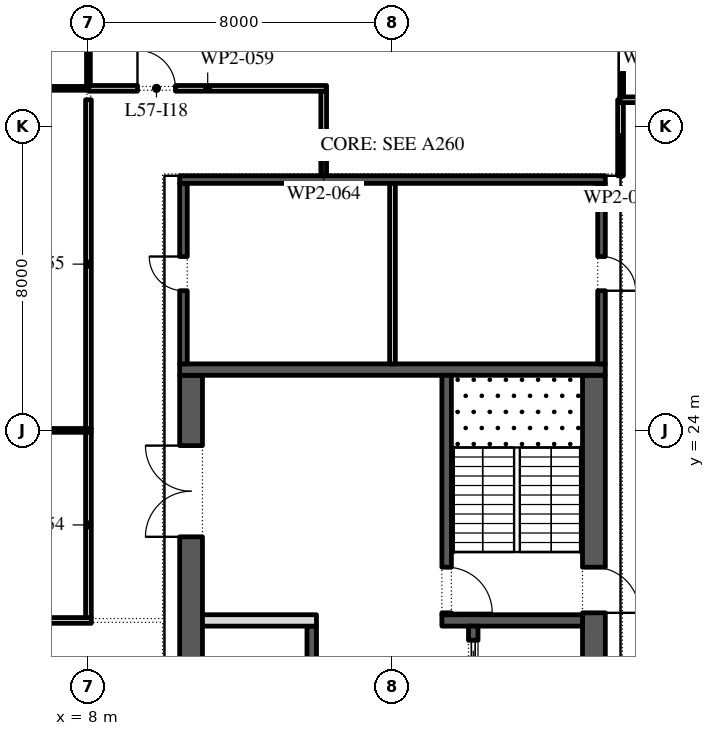
"""IFC4 building model, lengths in metres.
Left out: names, types, materials, properties, quantities, classifications, styles, units other than length and angle.
Written with IfcOpenShell. Run it as: python <this file> out.ifc"""

import sys

from ifc_helpers import new_model, si_unit, direction, frame, frame_2d, origin, place, context, subcontext, project, spatial, rectangle, extrude, element, fill, save


model = new_model("IFC4")
c1 = context("Model", 3, precision=1e-05, world=origin(), true_north=direction((0.0, 1.0)))
c2 = subcontext(c1, "Body", "Model", "MODEL_VIEW")
j1 = project(units=[si_unit("LENGTHUNIT", "METRE"), si_unit("PLANEANGLEUNIT", "RADIAN")], contexts=[c1])
p1 = place(None, origin())
s1 = spatial("IfcSite", under=j1, at=p1, CompositionType="ELEMENT")
p2 = place(p1, origin())
s2 = spatial("IfcBuilding", under=s1, at=p2, CompositionType="ELEMENT")
p3 = place(p2, frame((0.0, 0.0, 264.0)))
s3 = spatial("IfcBuildingStorey", under=s2, at=p3, CompositionType="ELEMENT", Elevation=264.0)
p4 = place(p3, frame((21.359, -11.678, 0.0), z_axis=(0.0, 0.0, 1.0), x_axis=(0.224949198343, 0.974370493275, 0.0)))
e1 = element("IfcWall", 1, at=p4, inside=s3, PredefinedType="STANDARD", context=c2, shape_type="SweptSolid", body=[
    extrude(rectangle(XDim=49.5, YDim=0.3, at=frame_2d((24.75, 0.0))), origin(), (0.0, 0.0, 1.0), 4.0),
])
p5 = place(p4, frame((1.157, 0.0, 0.45)))
e2 = element("IfcOpeningElement", 2, at=p5, cuts=e1, PredefinedType="OPENING", context=c2, shape_type="SweptSolid", body=[
    extrude(rectangle(XDim=4.5, YDim=3.05, at=frame_2d((2.25, 1.525))), frame((0.0, 0.16, 0.0), z_axis=(0.0, -1.0, 0.0), x_axis=(1.0, 0.0, 0.0)), (0.0, 0.0, 1.0), 0.32),
])
p6 = place(p4, frame((8.121, 0.0, 0.45)))
e3 = element("IfcOpeningElement", 3, at=p6, cuts=e1, PredefinedType="OPENING", context=c2, shape_type="SweptSolid", body=[
    extrude(rectangle(XDim=4.5, YDim=3.05, at=frame_2d((2.25, 1.525))), frame((0.0, 0.16, 0.0), z_axis=(0.0, -1.0, 0.0), x_axis=(1.0, 0.0, 0.0)), (0.0, 0.0, 1.0), 0.32),
])
p7 = place(p4, frame((15.236, 0.0, 0.45)))
e4 = element("IfcOpeningElement", 4, at=p7, cuts=e1, PredefinedType="OPENING", context=c2, shape_type="SweptSolid", body=[
    extrude(rectangle(XDim=4.5, YDim=3.05, at=frame_2d((2.25, 1.525))), frame((0.0, 0.16, 0.0), z_axis=(0.0, -1.0, 0.0), x_axis=(1.0, 0.0, 0.0)), (0.0, 0.0, 1.0), 0.32),
])
p8 = place(p4, frame((22.35, 0.0, 0.45)))
e5 = element("IfcOpeningElement", 5, at=p8, cuts=e1, PredefinedType="OPENING", context=c2, shape_type="SweptSolid", body=[
    extrude(rectangle(XDim=4.5, YDim=3.05, at=frame_2d((2.25, 1.525))), frame((0.0, 0.16, 0.0), z_axis=(0.0, -1.0, 0.0), x_axis=(1.0, 0.0, 0.0)), (0.0, 0.0, 1.0), 0.32),
])
p9 = place(p4, frame((29.464, 0.0, 0.45)))
e6 = element("IfcOpeningElement", 6, at=p9, cuts=e1, PredefinedType="OPENING", context=c2, shape_type="SweptSolid", body=[
    extrude(rectangle(XDim=4.5, YDim=2.95, at=frame_2d((2.25, 1.475))), frame((0.0, 0.16, 0.0), z_axis=(0.0, -1.0, 0.0), x_axis=(1.0, 0.0, 0.0)), (0.0, 0.0, 1.0), 0.32),
])
p10 = place(p4, frame((37.628, 0.0, 0.0)))
e7 = element("IfcOpeningElement", 7, at=p10, cuts=e1, PredefinedType="OPENING", context=c2, shape_type="SweptSolid", body=[
    extrude(rectangle(XDim=2.4, YDim=3.325, at=frame_2d((1.2, 1.663))), frame((0.0, 0.16, 0.0), z_axis=(0.0, -1.0, 0.0), x_axis=(1.0, 0.0, 0.0)), (0.0, 0.0, 1.0), 0.32),
])
p11 = place(p4, frame((43.693, 0.0, 0.45)))
e8 = element("IfcOpeningElement", 8, at=p11, cuts=e1, PredefinedType="OPENING", context=c2, shape_type="SweptSolid", body=[
    extrude(rectangle(XDim=4.5, YDim=3.05, at=frame_2d((2.25, 1.525))), frame((0.0, 0.16, 0.0), z_axis=(0.0, -1.0, 0.0), x_axis=(1.0, 0.0, 0.0)), (0.0, 0.0, 1.0), 0.32),
])
p12 = place(p3, frame((21.3, -2.45, 0.0), z_axis=(0.0, 0.0, 1.0), x_axis=(0.0, 1.0, 0.0)))
e9 = element("IfcWall", 9, at=p12, inside=s3, PredefinedType="SHEAR", context=c2, shape_type="SweptSolid", body=[
    extrude(rectangle(XDim=27.9, YDim=0.6, at=frame_2d((13.95, 0.0))), origin(), (0.0, 0.0, 1.0), 4.0),
])
p13 = place(p12, frame((5.05, 0.0, 0.0)))
e10 = element("IfcOpeningElement", 10, at=p13, cuts=e9, PredefinedType="OPENING", context=c2, shape_type="SweptSolid", body=[
    extrude(rectangle(XDim=1.2, YDim=2.1, at=frame_2d((0.6, 1.05))), frame((0.0, 0.31, 0.0), z_axis=(0.0, -1.0, 0.0), x_axis=(1.0, 0.0, 0.0)), (0.0, 0.0, 1.0), 0.62),
])
p14 = place(p12, frame((21.65, 0.0, 0.0)))
e11 = element("IfcOpeningElement", 11, at=p14, cuts=e9, PredefinedType="OPENING", context=c2, shape_type="SweptSolid", body=[
    extrude(rectangle(XDim=1.2, YDim=2.1, at=frame_2d((0.6, 1.05))), frame((0.0, 0.31, 0.0), z_axis=(0.0, -1.0, 0.0), x_axis=(1.0, 0.0, 0.0)), (0.0, 0.0, 1.0), 0.62),
])
p15 = place(p3, frame((10.7, -2.45, 0.0), z_axis=(0.0, 0.0, 1.0), x_axis=(0.0, 1.0, 0.0)))
e12 = element("IfcWall", 12, at=p15, inside=s3, PredefinedType="SHEAR", context=c2, shape_type="SweptSolid", body=[
    extrude(rectangle(XDim=27.9, YDim=0.6, at=frame_2d((13.95, 0.0))), origin(), (0.0, 0.0, 1.0), 4.0),
])
p16 = place(p15, frame((23.65, 0.0, 0.0)))
e13 = element("IfcOpeningElement", 13, at=p16, cuts=e12, PredefinedType="OPENING", context=c2, shape_type="SweptSolid", body=[
    extrude(rectangle(XDim=2.4, YDim=2.1, at=frame_2d((1.2, 1.05))), frame((0.0, 0.31, 0.0), z_axis=(0.0, -1.0, 0.0), x_axis=(1.0, 0.0, 0.0)), (0.0, 0.0, 1.0), 0.62),
])
p17 = place(p15, frame((1.387, 0.0, 0.0)))
e14 = element("IfcOpeningElement", 14, at=p17, cuts=e12, PredefinedType="OPENING", context=c2, shape_type="SweptSolid", body=[
    extrude(rectangle(XDim=0.9, YDim=2.1, at=frame_2d((0.45, 1.05))), frame((0.0, 0.31, 0.0), z_axis=(0.0, -1.0, 0.0), x_axis=(1.0, 0.0, 0.0)), (0.0, 0.0, 1.0), 0.62),
])
p18 = place(p15, frame((4.562, 0.0, 0.0)))
e15 = element("IfcOpeningElement", 15, at=p18, cuts=e12, PredefinedType="OPENING", context=c2, shape_type="SweptSolid", body=[
    extrude(rectangle(XDim=1.0, YDim=2.1, at=frame_2d((0.5, 1.05))), frame((0.0, 0.31, 0.0), z_axis=(0.0, -1.0, 0.0), x_axis=(1.0, 0.0, 0.0)), (0.0, 0.0, 1.0), 0.62),
])
p19 = place(p3, frame((10.4, 25.6, 0.0), z_axis=(0.0, 0.0, 1.0), x_axis=(1.0, 0.0, 0.0)))
e16 = element("IfcWall", 16, at=p19, inside=s3, PredefinedType="SHEAR", context=c2, shape_type="SweptSolid", body=[
    extrude(rectangle(XDim=11.2, YDim=0.3, at=frame_2d((5.6, 0.0))), origin(), (0.0, 0.0, 1.0), 4.0),
])
p20 = place(p3, frame((17.3, 19.0, 0.0), z_axis=(0.0, 0.0, 1.0), x_axis=(1.0, 0.0, 0.0)))
e17 = element("IfcWall", 17, at=p20, inside=s3, PredefinedType="SHEAR", context=c2, shape_type="SweptSolid", body=[
    extrude(rectangle(XDim=3.7, YDim=0.3, at=frame_2d((1.85, 0.0))), origin(), (0.0, 0.0, 1.0), 4.0),
])
p21 = place(p3, frame((17.425, 19.15, 0.0), z_axis=(0.0, 0.0, 1.0), x_axis=(0.0, 1.0, 0.0)))
e18 = element("IfcWall", 18, at=p21, inside=s3, PredefinedType="SHEAR", context=c2, shape_type="SweptSolid", body=[
    extrude(rectangle(XDim=6.3, YDim=0.25, at=frame_2d((3.15, 0.0))), origin(), (0.0, 0.0, 1.0), 4.0),
])
p22 = place(p21, frame((0.05, 0.0, 0.0)))
e19 = element("IfcOpeningElement", 19, at=p22, cuts=e18, PredefinedType="OPENING", context=c2, shape_type="SweptSolid", body=[
    extrude(rectangle(XDim=1.2, YDim=2.1, at=frame_2d((0.6, 1.05))), frame((0.0, 0.135, 0.0), z_axis=(0.0, -1.0, 0.0), x_axis=(1.0, 0.0, 0.0)), (0.0, 0.0, 1.0), 0.27),
])
p23 = place(p3, frame((18.125, 4.15, 0.0), z_axis=(0.0, 0.0, 1.0), x_axis=(0.0, 1.0, 0.0)))
e20 = element("IfcWall", 20, at=p23, inside=s3, PredefinedType="SHEAR", context=c2, shape_type="SweptSolid", body=[
    extrude(rectangle(XDim=14.7, YDim=0.25, at=frame_2d((7.35, 0.0))), origin(), (0.0, 0.0, 1.0), 4.0),
])
p24 = place(p23, frame((3.446, 0.0, 0.0)))
e21 = element("IfcOpeningElement", 21, at=p24, cuts=e20, PredefinedType="OPENING", context=c2, shape_type="SweptSolid", body=[
    extrude(rectangle(XDim=0.9, YDim=2.1, at=frame_2d((0.45, 1.05))), frame((0.0, 0.135, 0.0), z_axis=(0.0, -1.0, 0.0), x_axis=(1.0, 0.0, 0.0)), (0.0, 0.0, 1.0), 0.27),
])
p25 = place(p23, frame((6.9, 0.0, 0.0)))
e22 = element("IfcOpeningElement", 22, at=p25, cuts=e20, PredefinedType="OPENING", context=c2, shape_type="SweptSolid", body=[
    extrude(rectangle(XDim=0.9, YDim=2.1, at=frame_2d((0.45, 1.05))), frame((0.0, 0.135, 0.0), z_axis=(0.0, -1.0, 0.0), x_axis=(1.0, 0.0, 0.0)), (0.0, 0.0, 1.0), 0.27),
])
p26 = place(p23, frame((10.354, 0.0, 0.0)))
e23 = element("IfcOpeningElement", 23, at=p26, cuts=e20, PredefinedType="OPENING", context=c2, shape_type="SweptSolid", body=[
    extrude(rectangle(XDim=0.9, YDim=2.1, at=frame_2d((0.45, 1.05))), frame((0.0, 0.135, 0.0), z_axis=(0.0, -1.0, 0.0), x_axis=(1.0, 0.0, 0.0)), (0.0, 0.0, 1.0), 0.27),
])
p27 = place(p23, frame((0.371, 0.0, 0.0)))
e24 = element("IfcOpeningElement", 24, at=p27, cuts=e20, PredefinedType="OPENING", context=c2, shape_type="SweptSolid", body=[
    extrude(rectangle(XDim=1.1, YDim=2.1, at=frame_2d((0.55, 1.05))), frame((0.0, 0.135, 0.0), z_axis=(0.0, -1.0, 0.0), x_axis=(1.0, 0.0, 0.0)), (0.0, 0.0, 1.0), 0.27),
])
p28 = place(p23, frame((13.229, 0.0, 0.0)))
e25 = element("IfcOpeningElement", 25, at=p28, cuts=e20, PredefinedType="OPENING", context=c2, shape_type="SweptSolid", body=[
    extrude(rectangle(XDim=1.1, YDim=2.1, at=frame_2d((0.55, 1.05))), frame((0.0, 0.135, 0.0), z_axis=(0.0, -1.0, 0.0), x_axis=(1.0, 0.0, 0.0)), (0.0, 0.0, 1.0), 0.27),
])
p29 = place(p3, frame((13.875, -2.45, 0.0), z_axis=(0.0, 0.0, 1.0), x_axis=(0.0, 1.0, 0.0)))
e26 = element("IfcWall", 26, at=p29, inside=s3, PredefinedType="SHEAR", context=c2, shape_type="SweptSolid", body=[
    extrude(rectangle(XDim=21.3, YDim=0.25, at=frame_2d((10.65, 0.0))), origin(), (0.0, 0.0, 1.0), 4.0),
])
p30 = place(p29, frame((17.786, 0.0, 0.0)))
e27 = element("IfcOpeningElement", 27, at=p30, cuts=e26, PredefinedType="OPENING", context=c2, shape_type="SweptSolid", body=[
    extrude(rectangle(XDim=0.9, YDim=2.1, at=frame_2d((0.45, 1.05))), frame((0.0, 0.135, 0.0), z_axis=(0.0, -1.0, 0.0), x_axis=(1.0, 0.0, 0.0)), (0.0, 0.0, 1.0), 0.27),
])
p31 = place(p29, frame((6.971, 0.0, 0.0)))
e28 = element("IfcOpeningElement", 28, at=p31, cuts=e26, PredefinedType="OPENING", context=c2, shape_type="SweptSolid", body=[
    extrude(rectangle(XDim=1.1, YDim=2.1, at=frame_2d((0.55, 1.05))), frame((0.0, 0.135, 0.0), z_axis=(0.0, -1.0, 0.0), x_axis=(1.0, 0.0, 0.0)), (0.0, 0.0, 1.0), 0.27),
])
p32 = place(p29, frame((9.114, 0.0, 0.0)))
e29 = element("IfcOpeningElement", 29, at=p32, cuts=e26, PredefinedType="OPENING", context=c2, shape_type="SweptSolid", body=[
    extrude(rectangle(XDim=1.1, YDim=2.1, at=frame_2d((0.55, 1.05))), frame((0.0, 0.135, 0.0), z_axis=(0.0, -1.0, 0.0), x_axis=(1.0, 0.0, 0.0)), (0.0, 0.0, 1.0), 0.27),
])
p33 = place(p29, frame((11.257, 0.0, 0.0)))
e30 = element("IfcOpeningElement", 30, at=p33, cuts=e26, PredefinedType="OPENING", context=c2, shape_type="SweptSolid", body=[
    extrude(rectangle(XDim=1.1, YDim=2.1, at=frame_2d((0.55, 1.05))), frame((0.0, 0.135, 0.0), z_axis=(0.0, -1.0, 0.0), x_axis=(1.0, 0.0, 0.0)), (0.0, 0.0, 1.0), 0.27),
])
p34 = place(p29, frame((13.4, 0.0, 0.0)))
e31 = element("IfcOpeningElement", 31, at=p34, cuts=e26, PredefinedType="OPENING", context=c2, shape_type="SweptSolid", body=[
    extrude(rectangle(XDim=1.1, YDim=2.1, at=frame_2d((0.55, 1.05))), frame((0.0, 0.135, 0.0), z_axis=(0.0, -1.0, 0.0), x_axis=(1.0, 0.0, 0.0)), (0.0, 0.0, 1.0), 0.27),
])
p35 = place(p3, frame((11.0, 19.0, 0.0), z_axis=(0.0, 0.0, 1.0), x_axis=(1.0, 0.0, 0.0)))
e32 = element("IfcWall", 32, at=p35, inside=s3, PredefinedType="PARTITIONING", context=c2, shape_type="SweptSolid", body=[
    extrude(rectangle(XDim=3.0, YDim=0.3, at=frame_2d((1.5, 0.0))), origin(), (0.0, 0.0, 1.0), 4.0),
])
p36 = place(p3, frame((21.5, 25.75, 0.0), z_axis=(0.0, 0.0, 1.0), x_axis=(0.0, 1.0, 0.0)))
e33 = element("IfcWall", 33, at=p36, inside=s3, PredefinedType="SHEAR", context=c2, shape_type="SweptSolid", body=[
    extrude(rectangle(XDim=4.75, YDim=0.2, at=frame_2d((2.375, 0.0))), origin(), (0.0, 0.0, 1.0), 4.0),
])
p37 = place(p36, frame((1.925, 0.0, 0.0)))
e34 = element("IfcOpeningElement", 34, at=p37, cuts=e33, PredefinedType="OPENING", context=c2, shape_type="SweptSolid", body=[
    extrude(rectangle(XDim=0.9, YDim=2.1, at=frame_2d((0.45, 1.05))), frame((0.0, 0.11, 0.0), z_axis=(0.0, -1.0, 0.0), x_axis=(1.0, 0.0, 0.0)), (0.0, 0.0, 1.0), 0.22),
])
p38 = place(p3, frame((10.5, 25.75, 0.0), z_axis=(0.0, 0.0, 1.0), x_axis=(0.0, 1.0, 0.0)))
e35 = element("IfcWall", 35, at=p38, inside=s3, PredefinedType="SHEAR", context=c2, shape_type="SweptSolid", body=[
    extrude(rectangle(XDim=4.75, YDim=0.2, at=frame_2d((2.375, 0.0))), origin(), (0.0, 0.0, 1.0), 4.0),
])
p39 = place(p38, frame((1.925, 0.0, 0.0)))
e36 = element("IfcOpeningElement", 36, at=p39, cuts=e35, PredefinedType="OPENING", context=c2, shape_type="SweptSolid", body=[
    extrude(rectangle(XDim=0.9, YDim=2.1, at=frame_2d((0.45, 1.05))), frame((0.0, 0.11, 0.0), z_axis=(0.0, -1.0, 0.0), x_axis=(1.0, 0.0, 0.0)), (0.0, 0.0, 1.0), 0.22),
])
p40 = place(p3, frame((10.4, 30.6, 0.0), z_axis=(0.0, 0.0, 1.0), x_axis=(1.0, 0.0, 0.0)))
e37 = element("IfcWall", 37, at=p40, inside=s3, PredefinedType="SHEAR", context=c2, shape_type="SweptSolid", body=[
    extrude(rectangle(XDim=11.2, YDim=0.2, at=frame_2d((5.6, 0.0))), origin(), (0.0, 0.0, 1.0), 4.0),
])
p41 = place(p3, frame((16.0, 25.75, 0.0), z_axis=(0.0, 0.0, 1.0), x_axis=(0.0, 1.0, 0.0)))
e38 = element("IfcWall", 38, at=p41, inside=s3, PredefinedType="PARTITIONING", context=c2, shape_type="SweptSolid", body=[
    extrude(rectangle(XDim=4.75, YDim=0.15, at=frame_2d((2.375, 0.0))), origin(), (0.0, 0.0, 1.0), 4.0),
])
p42 = place(p3, frame((1.025, 19.0, 0.0), z_axis=(0.0, 0.0, 1.0), x_axis=(1.0, 0.0, 0.0)))
e39 = element("IfcWall", 39, at=p42, inside=s3, PredefinedType="PARTITIONING", context=c2, shape_type="SweptSolid", body=[
    extrude(rectangle(XDim=7.05, YDim=0.15, at=frame_2d((3.525, 0.0))), origin(), (0.0, 0.0, 1.0), 4.0),
])
p43 = place(p42, frame((3.825, 0.0, 0.0)))
e40 = element("IfcOpeningElement", 40, at=p43, cuts=e39, PredefinedType="OPENING", context=c2, shape_type="SweptSolid", body=[
    extrude(rectangle(XDim=1.0, YDim=2.1, at=frame_2d((0.5, 1.05))), frame((0.0, 0.085, 0.0), z_axis=(0.0, -1.0, 0.0), x_axis=(1.0, 0.0, 0.0)), (0.0, 0.0, 1.0), 0.17),
])
p44 = place(p3, frame((1.175, 24.0, 0.0), z_axis=(0.0, 0.0, 1.0), x_axis=(1.0, 0.0, 0.0)))
e41 = element("IfcWall", 41, at=p44, inside=s3, PredefinedType="PARTITIONING", context=c2, shape_type="SweptSolid", body=[
    extrude(rectangle(XDim=6.9, YDim=0.1, at=frame_2d((3.45, 0.0))), origin(), (0.0, 0.0, 1.0), 4.0),
])
p45 = place(p3, frame((8.0, 19.075, 0.0), z_axis=(0.0, 0.0, 1.0), x_axis=(0.0, 1.0, 0.0)))
e42 = element("IfcWall", 42, at=p45, inside=s3, PredefinedType="PARTITIONING", context=c2, shape_type="SweptSolid", body=[
    extrude(rectangle(XDim=4.875, YDim=0.15, at=frame_2d((2.438, 0.0))), origin(), (0.0, 0.0, 1.0), 4.0),
])
p46 = place(p3, frame((8.0, 24.05, 0.0), z_axis=(0.0, 0.0, 1.0), x_axis=(0.0, 1.0, 0.0)))
e43 = element("IfcWall", 43, at=p46, inside=s3, PredefinedType="PARTITIONING", context=c2, shape_type="SweptSolid", body=[
    extrude(rectangle(XDim=8.65, YDim=0.15, at=frame_2d((4.325, 0.0))), origin(), (0.0, 0.0, 1.0), 4.0),
])
p47 = place(p3, frame((8.05, 33.0, 0.0), z_axis=(0.0, 0.0, 1.0), x_axis=(-1.0, 0.0, 0.0)))
e44 = element("IfcWall", 44, at=p47, inside=s3, PredefinedType="PARTITIONING", context=c2, shape_type="SweptSolid", body=[
    extrude(rectangle(XDim=6.875, YDim=0.1, at=frame_2d((3.438, 0.0))), origin(), (0.0, 0.0, 1.0), 4.0),
])
p48 = place(p3, frame((8.0, 33.05, 0.0), z_axis=(0.0, 0.0, 1.0), x_axis=(0.0, 1.0, 0.0)))
e45 = element("IfcWall", 45, at=p48, inside=s3, PredefinedType="PARTITIONING", context=c2, shape_type="SweptSolid", body=[
    extrude(rectangle(XDim=6.5, YDim=0.1, at=frame_2d((3.25, 0.0))), origin(), (0.0, 0.0, 1.0), 4.0),
])
p49 = place(p3, frame((8.01, 33.0, 0.0), z_axis=(0.0, 0.0, 1.0), x_axis=(1.0, 0.0, 0.0)))
e46 = element("IfcWall", 46, at=p49, inside=s3, PredefinedType="PARTITIONING", context=c2, shape_type="SweptSolid", body=[
    extrude(rectangle(XDim=6.255, YDim=0.15, at=frame_2d((3.127, 0.0))), origin(), (0.0, 0.0, 1.0), 4.0),
])
p50 = place(p49, frame((1.28, 0.0, 0.0)))
e47 = element("IfcOpeningElement", 47, at=p50, cuts=e46, PredefinedType="OPENING", context=c2, shape_type="SweptSolid", body=[
    extrude(rectangle(XDim=1.0, YDim=2.1, at=frame_2d((0.5, 1.05))), frame((0.0, 0.085, 0.0), z_axis=(0.0, -1.0, 0.0), x_axis=(1.0, 0.0, 0.0)), (0.0, 0.0, 1.0), 0.17),
])
p51 = place(p3, frame((14.19, 32.925, 0.0), z_axis=(0.0, 0.0, 1.0), x_axis=(0.0, -1.0, 0.0)))
e48 = element("IfcWall", 48, at=p51, inside=s3, PredefinedType="PARTITIONING", context=c2, shape_type="SweptSolid", body=[
    extrude(rectangle(XDim=2.225, YDim=0.15, at=frame_2d((1.113, 0.0))), origin(), (0.0, 0.0, 1.0), 4.0),
])
p52 = place(p3, frame((22.0, 30.7, 0.0), z_axis=(0.0, 0.0, 1.0), x_axis=(0.0, 1.0, 0.0)))
e49 = element("IfcWall", 49, at=p52, inside=s3, PredefinedType="PARTITIONING", context=c2, shape_type="SweptSolid", body=[
    extrude(rectangle(XDim=2.0, YDim=0.15, at=frame_2d((1.0, 0.0))), origin(), (0.0, 0.0, 1.0), 4.0),
])
p53 = place(p3, frame((21.98, 32.7, 0.0), z_axis=(0.0, 0.0, 1.0), x_axis=(1.0, 0.0, 0.0)))
e50 = element("IfcWall", 50, at=p53, inside=s3, PredefinedType="PARTITIONING", context=c2, shape_type="SweptSolid", body=[
    extrude(rectangle(XDim=2.095, YDim=0.15, at=frame_2d((1.047, 0.0))), origin(), (0.0, 0.0, 1.0), 4.0),
])
p54 = place(p3, frame((22.03, 39.45, 0.0), z_axis=(0.0, 0.0, 1.0), x_axis=(0.0, -1.0, 0.0)))
e51 = element("IfcWall", 51, at=p54, inside=s3, PredefinedType="PARTITIONING", context=c2, shape_type="SweptSolid", body=[
    extrude(rectangle(XDim=6.675, YDim=0.1, at=frame_2d((3.337, 0.0))), origin(), (0.0, 0.0, 1.0), 4.0),
])
p55 = place(p28, origin())
e52 = element("IfcDoor", 52, at=p55, inside=s3, OperationType="SLIDING_TO_LEFT", PredefinedType="DOOR", context=c2, shape_type="SweptSolid", body=[
    extrude(rectangle(XDim=1.1, YDim=2.1, at=frame_2d((0.55, 1.05))), frame((0.0, 0.025, 0.0), z_axis=(0.0, -1.0, 0.0), x_axis=(1.0, 0.0, 0.0)), (0.0, 0.0, 1.0), 0.05),
])
fill(e25, e52)
p56 = place(p16, origin())
e53 = element("IfcDoor", 53, at=p56, inside=s3, OperationType="DOUBLE_DOOR_SINGLE_SWING", PredefinedType="DOOR", context=c2, shape_type="SweptSolid", body=[
    extrude(rectangle(XDim=2.4, YDim=2.1, at=frame_2d((1.2, 1.05))), frame((0.0, 0.025, 0.0), z_axis=(0.0, -1.0, 0.0), x_axis=(1.0, 0.0, 0.0)), (0.0, 0.0, 1.0), 0.05),
])
fill(e13, e53)
p57 = place(p22, frame((1.2, 0.0, 0.0), z_axis=(0.0, 0.0, 1.0), x_axis=(-1.0, 0.0, 0.0)))
e54 = element("IfcDoor", 54, at=p57, inside=s3, OperationType="SINGLE_SWING_LEFT", PredefinedType="DOOR", context=c2, shape_type="SweptSolid", body=[
    extrude(rectangle(XDim=1.2, YDim=2.1, at=frame_2d((0.6, 1.05))), frame((0.0, 0.025, 0.0), z_axis=(0.0, -1.0, 0.0), x_axis=(1.0, 0.0, 0.0)), (0.0, 0.0, 1.0), 0.05),
])
fill(e19, e54)
p58 = place(p14, frame((1.2, 0.0, 0.0), z_axis=(0.0, 0.0, 1.0), x_axis=(-1.0, 0.0, 0.0)))
e55 = element("IfcDoor", 55, at=p58, inside=s3, OperationType="SINGLE_SWING_LEFT", PredefinedType="DOOR", context=c2, shape_type="SweptSolid", body=[
    extrude(rectangle(XDim=1.2, YDim=2.1, at=frame_2d((0.6, 1.05))), frame((0.0, 0.025, 0.0), z_axis=(0.0, -1.0, 0.0), x_axis=(1.0, 0.0, 0.0)), (0.0, 0.0, 1.0), 0.05),
])
fill(e11, e55)
p59 = place(p37, frame((0.9, 0.15, 0.0), z_axis=(0.0, 0.0, 1.0), x_axis=(-1.0, 0.0, 0.0)))
e56 = element("IfcDoor", 56, at=p59, inside=s3, OperationType="SINGLE_SWING_LEFT", PredefinedType="DOOR", context=c2, shape_type="SweptSolid", body=[
    extrude(rectangle(XDim=0.9, YDim=2.1, at=frame_2d((0.45, 1.05))), frame((0.0, 0.1, 0.0), z_axis=(0.0, -1.0, 0.0), x_axis=(1.0, 0.0, 0.0)), (0.0, 0.0, 1.0), 0.05),
])
fill(e34, e56)
p60 = place(p39, origin())
e57 = element("IfcDoor", 57, at=p60, inside=s3, OperationType="SINGLE_SWING_LEFT", PredefinedType="DOOR", context=c2, shape_type="SweptSolid", body=[
    extrude(rectangle(XDim=0.9, YDim=2.1, at=frame_2d((0.45, 1.05))), frame((0.0, -0.05, 0.0), z_axis=(0.0, -1.0, 0.0), x_axis=(1.0, 0.0, 0.0)), (0.0, 0.0, 1.0), 0.05),
])
fill(e36, e57)
p61 = place(p50, origin())
e58 = element("IfcDoor", 58, at=p61, inside=s3, OperationType="SINGLE_SWING_RIGHT", PredefinedType="DOOR", context=c2, shape_type="SweptSolid", body=[
    extrude(rectangle(XDim=1.0, YDim=2.1, at=frame_2d((0.5, 1.05))), frame((0.0, 0.025, 0.0), z_axis=(0.0, -1.0, 0.0), x_axis=(1.0, 0.0, 0.0)), (0.0, 0.0, 1.0), 0.05),
])
fill(e47, e58)
save(model, sys.argv[1])
